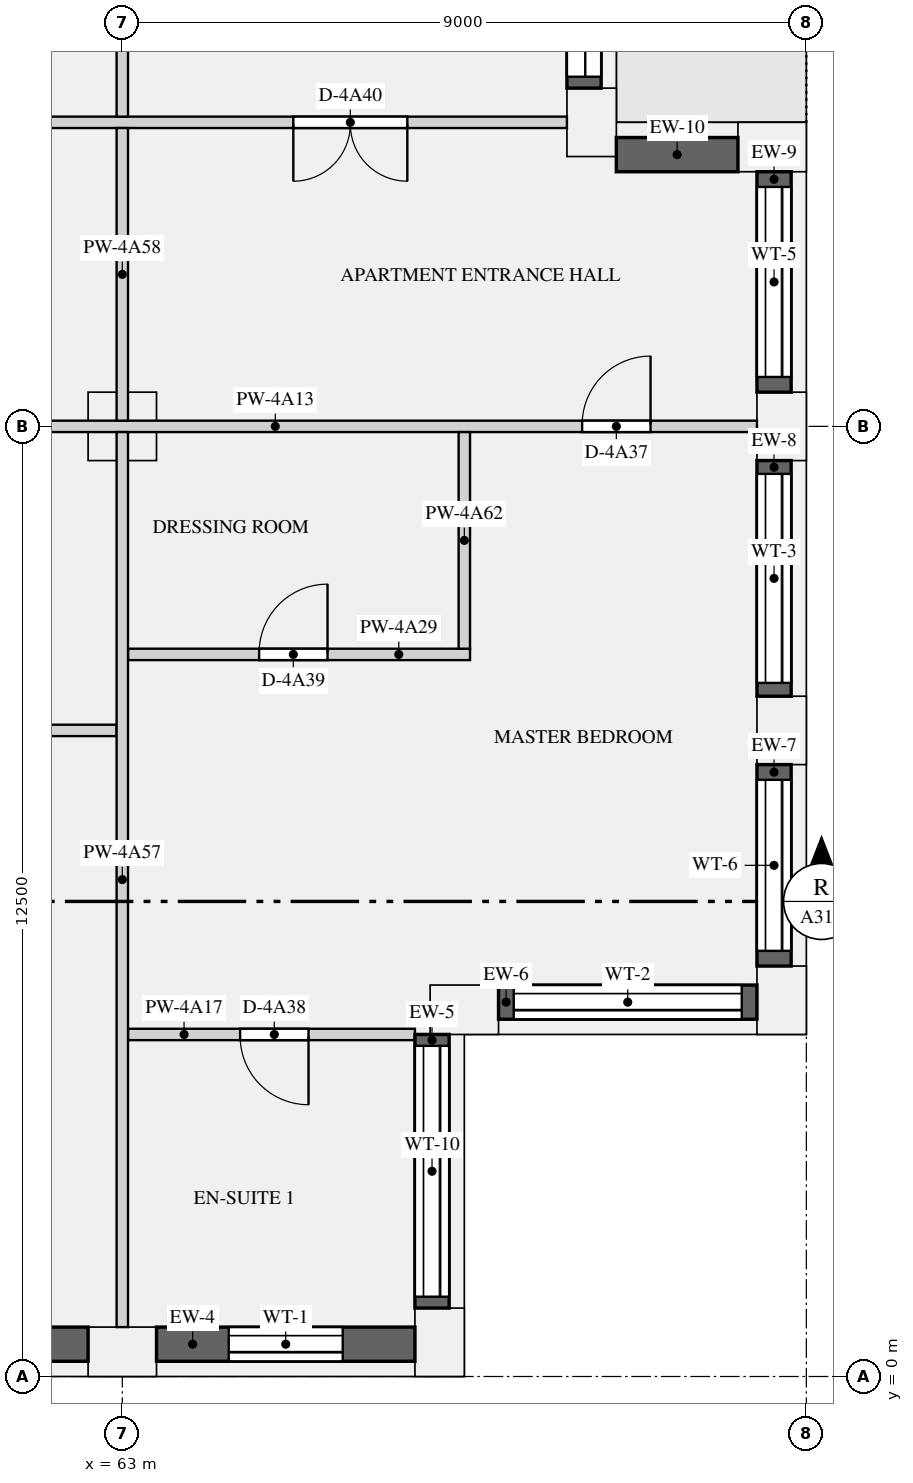
"""IFC4 building model, lengths in metres.
Left out: names, types, materials, properties, quantities, classifications, styles, units other than length and angle.
Written with IfcOpenShell. Run it as: python <this file> out.ifc"""

import sys

from ifc_helpers import new_model, si_unit, direction, frame, frame_2d, origin, origin_2d, place, context, subcontext, project, spatial, rectangle, extrude, element, fill, save


model = new_model("IFC4")
c1 = context("Model", 3, precision=1e-05, world=origin(), true_north=direction((0.0, 1.0)))
c2 = subcontext(c1, "Body", "Model", "MODEL_VIEW")
j1 = project(units=[si_unit("LENGTHUNIT", "METRE"), si_unit("PLANEANGLEUNIT", "RADIAN")], contexts=[c1])
p1 = place(None, origin())
s1 = spatial("IfcSite", under=j1, at=p1, CompositionType="ELEMENT")
p2 = place(p1, origin())
s2 = spatial("IfcBuilding", under=s1, at=p2, CompositionType="ELEMENT")
p3 = place(p2, frame((0.0, 0.0, 198.0)))
s3 = spatial("IfcBuildingStorey", under=s2, at=p3, CompositionType="ELEMENT", Elevation=198.0)
for number, where, z_axis, x_axis in (
    (1, (63.0, 0.325, 0.0), (0.0, 0.0, 1.0), (1.0, 0.0, 0.0)),
    (2, (67.175, 0.45, 0.0), (0.0, 0.0, 1.0), (0.0, 1.0, 0.0)),
    (3, (67.5, 4.825, 0.0), (0.0, 0.0, 1.0), (1.0, 0.0, 0.0)),
    (4, (71.675, 4.95, 0.0), (0.0, 0.0, 1.0), (0.0, 1.0, 0.0)),
    (5, (71.675, 8.5, 0.0), (0.0, 0.0, 1.0), (0.0, 1.0, 0.0)),
    (6, (71.675, 12.5, 0.0), (0.0, 0.0, 1.0), (0.0, 1.0, 0.0)),
    (7, (71.55, 16.175, 0.0), (0.0, 0.0, 1.0), (-1.0, 0.0, 0.0)),
    (8, (69.175, 16.5, 0.0), (0.0, 0.0, 1.0), (0.0, 1.0, 0.0)),
):
    element("IfcColumn", number, at=place(p3, frame(where, z_axis=z_axis, x_axis=x_axis)), inside=s3, PredefinedType="USERDEFINED", context=c2, shape_type="SweptSolid", body=[
        extrude(rectangle(XDim=0.9, YDim=0.65, at=origin_2d()), origin(), (0.0, 0.0, 1.0), 3.15),
    ])
p4 = place(p3, frame((63.0, 12.5, 0.0), z_axis=(0.0, 0.0, 1.0), x_axis=(1.0, 0.0, 0.0)))
e9 = element("IfcColumn", 9, at=p4, inside=s3, PredefinedType="COLUMN", context=c2, shape_type="SweptSolid", body=[
    extrude(rectangle(XDim=0.9, YDim=0.9, at=origin_2d()), origin(), (0.0, 0.0, 1.0), 3.15),
])
p5 = place(p3, frame((58.95, 0.425, 0.9), z_axis=(0.0, 0.0, 1.0), x_axis=(1.0, 0.0, 0.0)))
e10 = element("IfcWall", 10, at=p5, inside=s3, PredefinedType="SOLIDWALL", context=c2, shape_type="SweptSolid", body=[
    extrude(rectangle(XDim=3.6, YDim=0.45, at=frame_2d((1.8, 0.0))), origin(), (0.0, 0.0, 1.0), 1.93),
])
p6 = place(p5, frame((1.05, 0.0, 0.15)))
e11 = element("IfcOpeningElement", 11, at=p6, cuts=e10, PredefinedType="OPENING", context=c2, shape_type="SweptSolid", body=[
    extrude(rectangle(XDim=1.5, YDim=1.5, at=frame_2d((0.75, 0.75))), frame((0.0, 0.235, 0.0), z_axis=(0.0, -1.0, 0.0), x_axis=(1.0, 0.0, 0.0)), (0.0, 0.0, 1.0), 0.47),
])
p7 = place(p3, frame((63.45, 0.425, 0.9), z_axis=(0.0, 0.0, 1.0), x_axis=(1.0, 0.0, 0.0)))
e12 = element("IfcWall", 12, at=p7, inside=s3, PredefinedType="SOLIDWALL", context=c2, shape_type="SweptSolid", body=[
    extrude(rectangle(XDim=3.4, YDim=0.45, at=frame_2d((1.7, 0.0))), origin(), (0.0, 0.0, 1.0), 1.93),
])
p8 = place(p7, frame((0.95, 0.0, 0.15)))
e13 = element("IfcOpeningElement", 13, at=p8, cuts=e12, PredefinedType="OPENING", context=c2, shape_type="SweptSolid", body=[
    extrude(rectangle(XDim=1.5, YDim=1.5, at=frame_2d((0.75, 0.75))), frame((0.0, 0.235, 0.0), z_axis=(0.0, -1.0, 0.0), x_axis=(1.0, 0.0, 0.0)), (0.0, 0.0, 1.0), 0.47),
])
p9 = place(p3, frame((67.075, 0.9, 0.9), z_axis=(0.0, 0.0, 1.0), x_axis=(0.0, 1.0, 0.0)))
e14 = element("IfcWall", 14, at=p9, inside=s3, PredefinedType="SOLIDWALL", context=c2, shape_type="SweptSolid", body=[
    extrude(rectangle(XDim=3.6, YDim=0.45, at=frame_2d((1.8, 0.0))), origin(), (0.0, 0.0, 1.0), 1.93),
])
p10 = place(p9, frame((0.15, 0.0, 0.15)))
e15 = element("IfcOpeningElement", 15, at=p10, cuts=e14, PredefinedType="OPENING", context=c2, shape_type="SweptSolid", body=[
    extrude(rectangle(XDim=3.3, YDim=1.5, at=frame_2d((1.65, 0.75))), frame((0.0, 0.235, 0.0), z_axis=(0.0, -1.0, 0.0), x_axis=(1.0, 0.0, 0.0)), (0.0, 0.0, 1.0), 0.47),
])
p11 = place(p3, frame((67.95, 4.925, 0.9), z_axis=(0.0, 0.0, 1.0), x_axis=(1.0, 0.0, 0.0)))
e16 = element("IfcWall", 16, at=p11, inside=s3, PredefinedType="SOLIDWALL", context=c2, shape_type="SweptSolid", body=[
    extrude(rectangle(XDim=3.4, YDim=0.45, at=frame_2d((1.7, 0.0))), origin(), (0.0, 0.0, 1.0), 1.93),
])
p12 = place(p11, frame((0.2, 0.0, 0.15)))
e17 = element("IfcOpeningElement", 17, at=p12, cuts=e16, PredefinedType="OPENING", context=c2, shape_type="SweptSolid", body=[
    extrude(rectangle(XDim=3.0, YDim=1.5, at=frame_2d((1.5, 0.75))), frame((0.0, 0.235, 0.0), z_axis=(0.0, -1.0, 0.0), x_axis=(1.0, 0.0, 0.0)), (0.0, 0.0, 1.0), 0.47),
])
p13 = place(p3, frame((71.575, 5.4, 0.9), z_axis=(0.0, 0.0, 1.0), x_axis=(0.0, 1.0, 0.0)))
e18 = element("IfcWall", 18, at=p13, inside=s3, PredefinedType="SOLIDWALL", context=c2, shape_type="SweptSolid", body=[
    extrude(rectangle(XDim=2.65, YDim=0.45, at=frame_2d((1.325, 0.0))), origin(), (0.0, 0.0, 1.0), 1.93),
])
p14 = place(p13, frame((0.2, 0.0, 0.15)))
e19 = element("IfcOpeningElement", 19, at=p14, cuts=e18, PredefinedType="OPENING", context=c2, shape_type="SweptSolid", body=[
    extrude(rectangle(XDim=2.25, YDim=1.5, at=frame_2d((1.125, 0.75))), frame((0.0, 0.235, 0.0), z_axis=(0.0, -1.0, 0.0), x_axis=(1.0, 0.0, 0.0)), (0.0, 0.0, 1.0), 0.47),
])
p15 = place(p3, frame((71.575, 8.95, 0.9), z_axis=(0.0, 0.0, 1.0), x_axis=(0.0, 1.0, 0.0)))
e20 = element("IfcWall", 20, at=p15, inside=s3, PredefinedType="SOLIDWALL", context=c2, shape_type="SweptSolid", body=[
    extrude(rectangle(XDim=3.1, YDim=0.45, at=frame_2d((1.55, 0.0))), origin(), (0.0, 0.0, 1.0), 1.93),
])
p16 = place(p15, frame((0.175, 0.0, 0.15)))
e21 = element("IfcOpeningElement", 21, at=p16, cuts=e20, PredefinedType="OPENING", context=c2, shape_type="SweptSolid", body=[
    extrude(rectangle(XDim=2.75, YDim=1.5, at=frame_2d((1.375, 0.75))), frame((0.0, 0.235, 0.0), z_axis=(0.0, -1.0, 0.0), x_axis=(1.0, 0.0, 0.0)), (0.0, 0.0, 1.0), 0.47),
])
p17 = place(p3, frame((71.575, 12.95, 0.9), z_axis=(0.0, 0.0, 1.0), x_axis=(0.0, 1.0, 0.0)))
e22 = element("IfcWall", 22, at=p17, inside=s3, PredefinedType="SOLIDWALL", context=c2, shape_type="SweptSolid", body=[
    extrude(rectangle(XDim=2.9, YDim=0.45, at=frame_2d((1.45, 0.0))), origin(), (0.0, 0.0, 1.0), 1.93),
])
p18 = place(p17, frame((0.2, 0.0, 0.15)))
e23 = element("IfcOpeningElement", 23, at=p18, cuts=e22, PredefinedType="OPENING", context=c2, shape_type="SweptSolid", body=[
    extrude(rectangle(XDim=2.5, YDim=1.5, at=frame_2d((1.25, 0.75))), frame((0.0, 0.235, 0.0), z_axis=(0.0, -1.0, 0.0), x_axis=(1.0, 0.0, 0.0)), (0.0, 0.0, 1.0), 0.47),
])
p19 = place(p3, frame((71.1, 16.075, 0.9), z_axis=(0.0, 0.0, 1.0), x_axis=(-1.0, 0.0, 0.0)))
e24 = element("IfcWall", 24, at=p19, inside=s3, PredefinedType="SOLIDWALL", context=c2, shape_type="SweptSolid", body=[
    extrude(rectangle(XDim=1.6, YDim=0.45, at=frame_2d((0.8, 0.0))), origin(), (0.0, 0.0, 1.0), 1.93),
])
p20 = place(p3, frame((69.075, 16.95, 0.0), z_axis=(0.0, 0.0, 1.0), x_axis=(0.0, 1.0, 0.0)))
e25 = element("IfcWall", 25, at=p20, inside=s3, PredefinedType="SOLIDWALL", context=c2, shape_type="SweptSolid", body=[
    extrude(rectangle(XDim=3.1, YDim=0.45, at=frame_2d((1.55, 0.0))), origin(), (0.0, 0.0, 1.0), 2.83),
])
p21 = place(p20, frame((0.15, 0.0, 0.0)))
e26 = element("IfcOpeningElement", 26, at=p21, cuts=e25, PredefinedType="OPENING", context=c2, shape_type="SweptSolid", body=[
    extrude(rectangle(XDim=2.8, YDim=2.3, at=frame_2d((1.4, 1.15))), frame((0.0, 0.235, 0.0), z_axis=(0.0, -1.0, 0.0), x_axis=(1.0, 0.0, 0.0)), (0.0, 0.0, 1.0), 0.47),
])
p22 = place(p3, frame((54.1, 16.5, 0.0), z_axis=(0.0, 0.0, 1.0), x_axis=(1.0, 0.0, 0.0)))
e27 = element("IfcWall", 27, at=p22, inside=s3, PredefinedType="PARTITIONING", context=c2, shape_type="SweptSolid", body=[
    extrude(rectangle(XDim=14.75, YDim=0.15, at=frame_2d((7.375, 0.0))), origin(), (0.0, 0.0, 1.0), 2.83),
])
p23 = place(p22, frame((1.4, 0.0, 0.0)))
e28 = element("IfcOpeningElement", 28, at=p23, cuts=e27, PredefinedType="OPENING", context=c2, shape_type="SweptSolid", body=[
    extrude(rectangle(XDim=1.5, YDim=2.1, at=frame_2d((0.75, 1.05))), frame((0.0, 0.085, 0.0), z_axis=(0.0, -1.0, 0.0), x_axis=(1.0, 0.0, 0.0)), (0.0, 0.0, 1.0), 0.17),
])
p24 = place(p22, frame((11.15, 0.0, 0.0)))
e29 = element("IfcOpeningElement", 29, at=p24, cuts=e27, PredefinedType="OPENING", context=c2, shape_type="SweptSolid", body=[
    extrude(rectangle(XDim=1.5, YDim=2.1, at=frame_2d((0.75, 1.05))), frame((0.0, 0.085, 0.0), z_axis=(0.0, -1.0, 0.0), x_axis=(1.0, 0.0, 0.0)), (0.0, 0.0, 1.0), 0.17),
])
p25 = place(p3, frame((58.425, 12.5, 0.0), z_axis=(0.0, 0.0, 1.0), x_axis=(1.0, 0.0, 0.0)))
e30 = element("IfcWall", 30, at=p25, inside=s3, PredefinedType="PARTITIONING", context=c2, shape_type="SweptSolid", body=[
    extrude(rectangle(XDim=12.925, YDim=0.15, at=frame_2d((6.462, 0.0))), origin(), (0.0, 0.0, 1.0), 2.83),
])
p26 = place(p25, frame((1.65, 0.0, 0.0)))
e31 = element("IfcOpeningElement", 31, at=p26, cuts=e30, PredefinedType="OPENING", context=c2, shape_type="SweptSolid", body=[
    extrude(rectangle(XDim=0.9, YDim=2.1, at=frame_2d((0.45, 1.05))), frame((0.0, 0.085, 0.0), z_axis=(0.0, -1.0, 0.0), x_axis=(1.0, 0.0, 0.0)), (0.0, 0.0, 1.0), 0.17),
])
p27 = place(p25, frame((10.625, 0.0, 0.0)))
e32 = element("IfcOpeningElement", 32, at=p27, cuts=e30, PredefinedType="OPENING", context=c2, shape_type="SweptSolid", body=[
    extrude(rectangle(XDim=0.9, YDim=2.1, at=frame_2d((0.45, 1.05))), frame((0.0, 0.085, 0.0), z_axis=(0.0, -1.0, 0.0), x_axis=(1.0, 0.0, 0.0)), (0.0, 0.0, 1.0), 0.17),
])
p28 = place(p3, frame((54.0, 8.5, 0.0), z_axis=(0.0, 0.0, 1.0), x_axis=(1.0, 0.0, 0.0)))
e33 = element("IfcWall", 33, at=p28, inside=s3, PredefinedType="PARTITIONING", context=c2, shape_type="SweptSolid", body=[
    extrude(rectangle(XDim=8.925, YDim=0.15, at=frame_2d((4.462, 0.0))), origin(), (0.0, 0.0, 1.0), 2.83),
])
p29 = place(p28, frame((1.8, 0.0, 0.0)))
e34 = element("IfcOpeningElement", 34, at=p29, cuts=e33, PredefinedType="OPENING", context=c2, shape_type="SweptSolid", body=[
    extrude(rectangle(XDim=0.9, YDim=2.1, at=frame_2d((0.45, 1.05))), frame((0.0, 0.085, 0.0), z_axis=(0.0, -1.0, 0.0), x_axis=(1.0, 0.0, 0.0)), (0.0, 0.0, 1.0), 0.17),
])
p30 = place(p28, frame((6.3, 0.0, 0.0)))
e35 = element("IfcOpeningElement", 35, at=p30, cuts=e33, PredefinedType="OPENING", context=c2, shape_type="SweptSolid", body=[
    extrude(rectangle(XDim=0.9, YDim=2.1, at=frame_2d((0.45, 1.05))), frame((0.0, 0.085, 0.0), z_axis=(0.0, -1.0, 0.0), x_axis=(1.0, 0.0, 0.0)), (0.0, 0.0, 1.0), 0.17),
])
p31 = place(p3, frame((63.075, 4.5, 0.0), z_axis=(0.0, 0.0, 1.0), x_axis=(1.0, 0.0, 0.0)))
e36 = element("IfcWall", 36, at=p31, inside=s3, PredefinedType="PARTITIONING", context=c2, shape_type="SweptSolid", body=[
    extrude(rectangle(XDim=3.775, YDim=0.15, at=frame_2d((1.888, 0.0))), origin(), (0.0, 0.0, 1.0), 2.83),
])
p32 = place(p31, frame((1.475, 0.0, 0.0)))
e37 = element("IfcOpeningElement", 37, at=p32, cuts=e36, PredefinedType="OPENING", context=c2, shape_type="SweptSolid", body=[
    extrude(rectangle(XDim=0.9, YDim=2.1, at=frame_2d((0.45, 1.05))), frame((0.0, 0.085, 0.0), z_axis=(0.0, -1.0, 0.0), x_axis=(1.0, 0.0, 0.0)), (0.0, 0.0, 1.0), 0.17),
])
p33 = place(p3, frame((63.075, 9.5, 0.0), z_axis=(0.0, 0.0, 1.0), x_axis=(1.0, 0.0, 0.0)))
e38 = element("IfcWall", 38, at=p33, inside=s3, PredefinedType="PARTITIONING", context=c2, shape_type="SweptSolid", body=[
    extrude(rectangle(XDim=4.5, YDim=0.15, at=frame_2d((2.25, 0.0))), origin(), (0.0, 0.0, 1.0), 2.83),
])
p34 = place(p33, frame((1.725, 0.0, 0.0)))
e39 = element("IfcOpeningElement", 39, at=p34, cuts=e38, PredefinedType="OPENING", context=c2, shape_type="SweptSolid", body=[
    extrude(rectangle(XDim=0.9, YDim=2.1, at=frame_2d((0.45, 1.05))), frame((0.0, 0.085, 0.0), z_axis=(0.0, -1.0, 0.0), x_axis=(1.0, 0.0, 0.0)), (0.0, 0.0, 1.0), 0.17),
])
p35 = place(p3, frame((63.0, 0.65, 0.0), z_axis=(0.0, 0.0, 1.0), x_axis=(0.0, 1.0, 0.0)))
e40 = element("IfcWall", 40, at=p35, inside=s3, PredefinedType="PARTITIONING", context=c2, shape_type="SweptSolid", body=[
    extrude(rectangle(XDim=11.775, YDim=0.15, at=frame_2d((5.888, 0.0))), origin(), (0.0, 0.0, 1.0), 2.83),
])
p36 = place(p3, frame((63.0, 12.575, 0.0), z_axis=(0.0, 0.0, 1.0), x_axis=(0.0, 1.0, 0.0)))
e41 = element("IfcWall", 41, at=p36, inside=s3, PredefinedType="PARTITIONING", context=c2, shape_type="SweptSolid", body=[
    extrude(rectangle(XDim=3.85, YDim=0.15, at=frame_2d((1.925, 0.0))), origin(), (0.0, 0.0, 1.0), 2.83),
])
p37 = place(p3, frame((63.0, 16.575, 0.0), z_axis=(0.0, 0.0, 1.0), x_axis=(0.0, 1.0, 0.0)))
e42 = element("IfcWall", 42, at=p37, inside=s3, PredefinedType="PARTITIONING", context=c2, shape_type="SweptSolid", body=[
    extrude(rectangle(XDim=7.85, YDim=0.15, at=frame_2d((3.925, 0.0))), origin(), (0.0, 0.0, 1.0), 2.83),
])
p38 = place(p37, frame((3.0, 0.0, 0.0)))
e43 = element("IfcOpeningElement", 43, at=p38, cuts=e42, PredefinedType="OPENING", context=c2, shape_type="SweptSolid", body=[
    extrude(rectangle(XDim=0.9, YDim=2.1, at=frame_2d((0.45, 1.05))), frame((0.0, 0.085, 0.0), z_axis=(0.0, -1.0, 0.0), x_axis=(1.0, 0.0, 0.0)), (0.0, 0.0, 1.0), 0.17),
])
p39 = place(p3, frame((67.5, 9.575, 0.0), z_axis=(0.0, 0.0, 1.0), x_axis=(0.0, 1.0, 0.0)))
e44 = element("IfcWall", 44, at=p39, inside=s3, PredefinedType="PARTITIONING", context=c2, shape_type="SweptSolid", body=[
    extrude(rectangle(XDim=2.85, YDim=0.15, at=frame_2d((1.425, 0.0))), origin(), (0.0, 0.0, 1.0), 2.83),
])
p40 = place(p8, origin())
e45 = element("IfcWindow", 45, at=p40, inside=s3, PartitioningType="SINGLE_PANEL", PredefinedType="WINDOW", context=c2, shape_type="SweptSolid", body=[
    extrude(rectangle(XDim=1.5, YDim=1.5, at=frame_2d((0.75, 0.75))), frame((0.0, -0.065, 0.0), z_axis=(0.0, -1.0, 0.0), x_axis=(1.0, 0.0, 0.0)), (0.0, 0.0, 1.0), 0.06),
])
fill(e13, e45)
p41 = place(p10, origin())
e46 = element("IfcWindow", 46, at=p41, inside=s3, PartitioningType="SINGLE_PANEL", PredefinedType="WINDOW", context=c2, shape_type="SweptSolid", body=[
    extrude(rectangle(XDim=3.3, YDim=1.5, at=frame_2d((1.65, 0.75))), frame((0.0, -0.065, 0.0), z_axis=(0.0, -1.0, 0.0), x_axis=(1.0, 0.0, 0.0)), (0.0, 0.0, 1.0), 0.06),
])
fill(e15, e46)
p42 = place(p12, origin())
e47 = element("IfcWindow", 47, at=p42, inside=s3, PartitioningType="SINGLE_PANEL", PredefinedType="WINDOW", context=c2, shape_type="SweptSolid", body=[
    extrude(rectangle(XDim=3.0, YDim=1.5, at=frame_2d((1.5, 0.75))), frame((0.0, -0.065, 0.0), z_axis=(0.0, -1.0, 0.0), x_axis=(1.0, 0.0, 0.0)), (0.0, 0.0, 1.0), 0.06),
])
fill(e17, e47)
p43 = place(p14, origin())
e48 = element("IfcWindow", 48, at=p43, inside=s3, PartitioningType="SINGLE_PANEL", PredefinedType="WINDOW", context=c2, shape_type="SweptSolid", body=[
    extrude(rectangle(XDim=2.25, YDim=1.5, at=frame_2d((1.125, 0.75))), frame((0.0, -0.065, 0.0), z_axis=(0.0, -1.0, 0.0), x_axis=(1.0, 0.0, 0.0)), (0.0, 0.0, 1.0), 0.06),
])
fill(e19, e48)
p44 = place(p16, origin())
e49 = element("IfcWindow", 49, at=p44, inside=s3, PartitioningType="SINGLE_PANEL", PredefinedType="WINDOW", context=c2, shape_type="SweptSolid", body=[
    extrude(rectangle(XDim=2.75, YDim=1.5, at=frame_2d((1.375, 0.75))), frame((0.0, -0.065, 0.0), z_axis=(0.0, -1.0, 0.0), x_axis=(1.0, 0.0, 0.0)), (0.0, 0.0, 1.0), 0.06),
])
fill(e21, e49)
p45 = place(p18, origin())
e50 = element("IfcWindow", 50, at=p45, inside=s3, PartitioningType="SINGLE_PANEL", PredefinedType="WINDOW", context=c2, shape_type="SweptSolid", body=[
    extrude(rectangle(XDim=2.5, YDim=1.5, at=frame_2d((1.25, 0.75))), frame((0.0, -0.065, 0.0), z_axis=(0.0, -1.0, 0.0), x_axis=(1.0, 0.0, 0.0)), (0.0, 0.0, 1.0), 0.06),
])
fill(e23, e50)
p46 = place(p21, origin())
e51 = element("IfcDoor", 51, at=p46, inside=s3, OperationType="SLIDING_TO_LEFT", PredefinedType="DOOR", context=c2, shape_type="SweptSolid", body=[
    extrude(rectangle(XDim=2.8, YDim=2.3, at=frame_2d((1.4, 1.15))), frame((0.0, -0.07, 0.0), z_axis=(0.0, -1.0, 0.0), x_axis=(1.0, 0.0, 0.0)), (0.0, 0.0, 1.0), 0.05),
])
fill(e26, e51)
p47 = place(p27, origin())
e52 = element("IfcDoor", 52, at=p47, inside=s3, OperationType="SINGLE_SWING_RIGHT", PredefinedType="DOOR", context=c2, shape_type="SweptSolid", body=[
    extrude(rectangle(XDim=0.9, YDim=2.1, at=frame_2d((0.45, 1.05))), frame((0.0, 0.025, 0.0), z_axis=(0.0, -1.0, 0.0), x_axis=(1.0, 0.0, 0.0)), (0.0, 0.0, 1.0), 0.05),
])
fill(e32, e52)
p48 = place(p32, frame((0.9, 0.0, 0.0), z_axis=(0.0, 0.0, 1.0), x_axis=(-1.0, 0.0, 0.0)))
e53 = element("IfcDoor", 53, at=p48, inside=s3, OperationType="SINGLE_SWING_LEFT", PredefinedType="DOOR", context=c2, shape_type="SweptSolid", body=[
    extrude(rectangle(XDim=0.9, YDim=2.1, at=frame_2d((0.45, 1.05))), frame((0.0, 0.025, 0.0), z_axis=(0.0, -1.0, 0.0), x_axis=(1.0, 0.0, 0.0)), (0.0, 0.0, 1.0), 0.05),
])
fill(e37, e53)
p49 = place(p34, origin())
e54 = element("IfcDoor", 54, at=p49, inside=s3, OperationType="SINGLE_SWING_RIGHT", PredefinedType="DOOR", context=c2, shape_type="SweptSolid", body=[
    extrude(rectangle(XDim=0.9, YDim=2.1, at=frame_2d((0.45, 1.05))), frame((0.0, 0.025, 0.0), z_axis=(0.0, -1.0, 0.0), x_axis=(1.0, 0.0, 0.0)), (0.0, 0.0, 1.0), 0.05),
])
fill(e39, e54)
p50 = place(p24, frame((1.5, 0.0, 0.0), z_axis=(0.0, 0.0, 1.0), x_axis=(-1.0, 0.0, 0.0)))
e55 = element("IfcDoor", 55, at=p50, inside=s3, OperationType="DOUBLE_DOOR_SINGLE_SWING", PredefinedType="DOOR", context=c2, shape_type="SweptSolid", body=[
    extrude(rectangle(XDim=1.5, YDim=2.1, at=frame_2d((0.75, 1.05))), frame((0.0, 0.025, 0.0), z_axis=(0.0, -1.0, 0.0), x_axis=(1.0, 0.0, 0.0)), (0.0, 0.0, 1.0), 0.05),
])
fill(e29, e55)
save(model, sys.argv[1])
